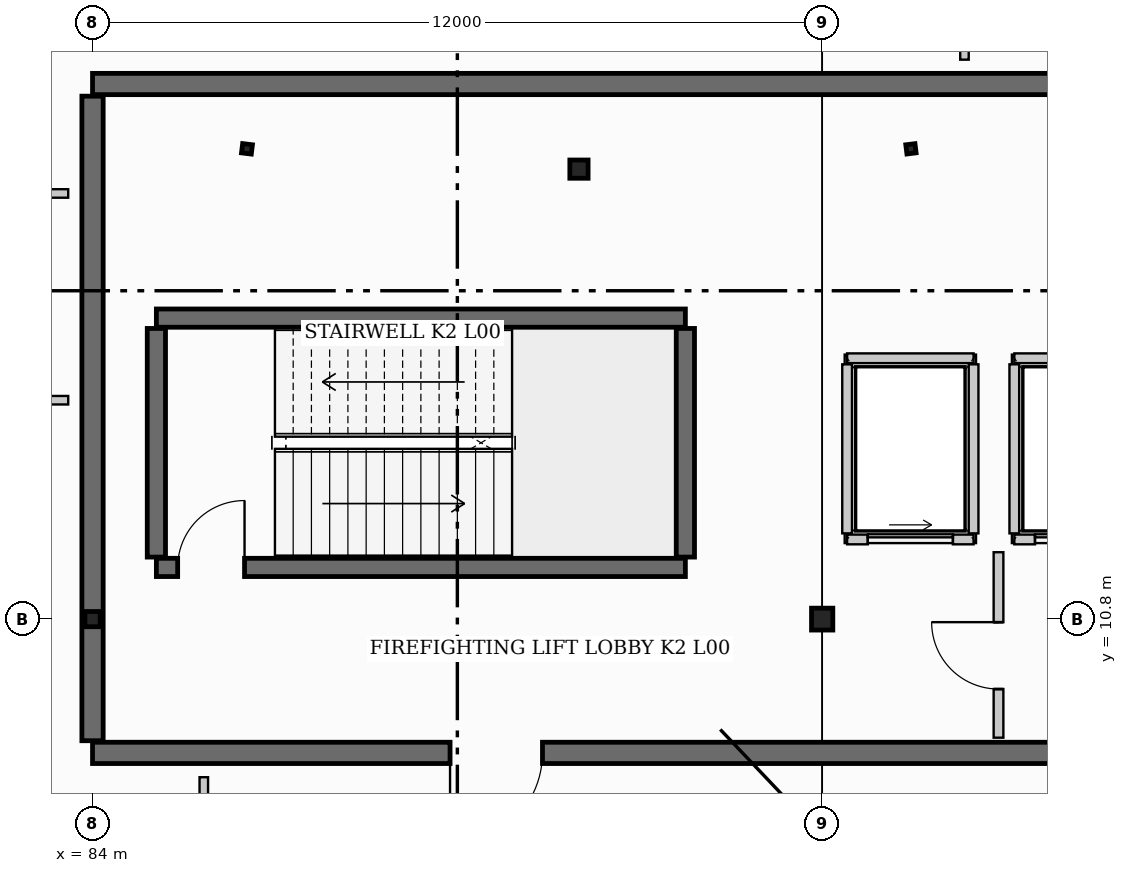
"""IFC4 building model, lengths in metres.
Left out: names, types, materials, properties, quantities, classifications, styles, units other than length and angle.
Written with IfcOpenShell. Run it as: python <this file> out.ifc"""

import sys

from ifc_helpers import new_model, si_unit, direction, frame, frame_2d, origin, origin_2d, place, context, subcontext, project, spatial, rectangle, hollow_rectangle, i_section, extrude, element, fill, save


model = new_model("IFC4")
c1 = context("Model", 3, precision=1e-05, world=origin(), true_north=direction((0.0, 1.0)))
c2 = subcontext(c1, "Body", "Model", "MODEL_VIEW")
j1 = project(units=[si_unit("LENGTHUNIT", "METRE"), si_unit("PLANEANGLEUNIT", "RADIAN")], contexts=[c1])
p1 = place(None, origin())
s1 = spatial("IfcSite", under=j1, at=p1, CompositionType="ELEMENT")
p2 = place(p1, origin())
s2 = spatial("IfcBuilding", under=s1, at=p2, CompositionType="ELEMENT")
p3 = place(p2, origin())
s3 = spatial("IfcBuildingStorey", under=s2, at=p3, CompositionType="ELEMENT", Elevation=0.0)
p4 = place(p3, frame((84.0, 10.8, 0.0), z_axis=(0.0, 0.0, 1.0), x_axis=(0.0, 1.0, 0.0)))
e1 = element("IfcColumn", 1, at=p4, inside=s3, PredefinedType="COLUMN", context=c2, shape_type="SweptSolid", body=[
    extrude(hollow_rectangle(XDim=0.25, YDim=0.25, WallThickness=0.012, at=origin_2d()), origin(), (0.0, 0.0, 1.0), 4.8),
])
p5 = place(p3, frame((96.0, 10.8, 0.0), z_axis=(0.0, 0.0, 1.0), x_axis=(1.0, 0.0, 0.0)))
e2 = element("IfcColumn", 2, at=p5, inside=s3, PredefinedType="COLUMN", context=c2, shape_type="SweptSolid", body=[
    extrude(i_section(OverallWidth=0.35, OverallDepth=0.36, WebThickness=0.016, FlangeThickness=0.028, at=origin_2d()), origin(), (0.0, 0.0, 1.0), 4.8),
])
p6 = place(p3, frame((86.54, 18.534, 0.0), z_axis=(0.0, 0.0, 1.0), x_axis=(0.121869343405, 0.992546151641, 0.0)))
e3 = element("IfcColumn", 3, at=p6, inside=s3, PredefinedType="COLUMN", context=c2, shape_type="SweptSolid", body=[
    extrude(i_section(OverallWidth=0.154, OverallDepth=0.162, WebThickness=0.008, FlangeThickness=0.011, at=origin_2d()), origin(), (0.0, 0.0, 1.0), 4.8),
])
p7 = place(p3, frame((92.0, 18.2, 0.0), z_axis=(0.0, 0.0, 1.0), x_axis=(0.0, 1.0, 0.0)))
e4 = element("IfcColumn", 4, at=p7, inside=s3, PredefinedType="COLUMN", context=c2, shape_type="SweptSolid", body=[
    extrude(hollow_rectangle(XDim=0.3, YDim=0.3, WallThickness=0.012, at=origin_2d()), origin(), (0.0, 0.0, 1.0), 4.8),
])
p8 = place(p3, frame((97.46, 18.534, 0.0), z_axis=(0.0, 0.0, 1.0), x_axis=(-0.121869343405, 0.992546151641, 0.0)))
e5 = element("IfcColumn", 5, at=p8, inside=s3, PredefinedType="COLUMN", context=c2, shape_type="SweptSolid", body=[
    extrude(i_section(OverallWidth=0.152, OverallDepth=0.152, WebThickness=0.006, FlangeThickness=0.007, at=origin_2d()), origin(), (0.0, 0.0, 1.0), 4.8),
])
p9 = place(p3, frame((84.0, 19.6, 0.0), z_axis=(0.0, 0.0, 1.0), x_axis=(1.0, 0.0, 0.0)))
e6 = element("IfcWall", 6, at=p9, inside=s3, PredefinedType="SHEAR", context=c2, shape_type="SweptSolid", body=[
    extrude(rectangle(XDim=20.4, YDim=0.35, at=frame_2d((10.2, 0.0))), origin(), (0.0, 0.0, 1.0), 4.8),
])
p10 = place(p3, frame((104.4, 8.6, 0.0), z_axis=(0.0, 0.0, 1.0), x_axis=(-1.0, 0.0, 0.0)))
e7 = element("IfcWall", 7, at=p10, inside=s3, PredefinedType="SHEAR", context=c2, shape_type="SweptSolid", body=[
    extrude(rectangle(XDim=20.4, YDim=0.35, at=frame_2d((10.2, 0.0))), origin(), (0.0, 0.0, 1.0), 4.8),
])
p11 = place(p10, frame((2.2, 0.0, 0.0)))
e8 = element("IfcOpeningElement", 8, at=p11, cuts=e7, PredefinedType="OPENING", context=c2, shape_type="SweptSolid", body=[
    extrude(rectangle(XDim=1.64, YDim=2.2, at=frame_2d((0.82, 1.1))), frame((0.0, 0.185, 0.0), z_axis=(0.0, -1.0, 0.0), x_axis=(1.0, 0.0, 0.0)), (0.0, 0.0, 1.0), 0.37),
])
p12 = place(p10, frame((13.0, 0.0, 0.0)))
e9 = element("IfcOpeningElement", 9, at=p12, cuts=e7, PredefinedType="OPENING", context=c2, shape_type="SweptSolid", body=[
    extrude(rectangle(XDim=1.52, YDim=2.16, at=frame_2d((0.76, 1.08))), frame((0.0, 0.185, 0.0), z_axis=(0.0, -1.0, 0.0), x_axis=(1.0, 0.0, 0.0)), (0.0, 0.0, 1.0), 0.37),
])
p13 = place(p3, frame((84.0, 8.8, 0.0), z_axis=(0.0, 0.0, 1.0), x_axis=(0.0, 1.0, 0.0)))
e10 = element("IfcWall", 10, at=p13, inside=s3, PredefinedType="SHEAR", context=c2, shape_type="SweptSolid", body=[
    extrude(rectangle(XDim=10.6, YDim=0.35, at=frame_2d((5.3, 0.0))), origin(), (0.0, 0.0, 1.0), 4.8),
])
p14 = place(p3, frame((85.05, 11.65, 0.0), z_axis=(0.0, 0.0, 1.0), x_axis=(1.0, 0.0, 0.0)))
e11 = element("IfcWall", 11, at=p14, inside=s3, PredefinedType="SHEAR", context=c2, shape_type="SweptSolid", body=[
    extrude(rectangle(XDim=8.7, YDim=0.3, at=frame_2d((4.35, 0.0))), origin(), (0.0, 0.0, 1.0), 4.8),
])
p15 = place(p14, frame((0.35, 0.0, 0.0)))
e12 = element("IfcOpeningElement", 12, at=p15, cuts=e11, PredefinedType="OPENING", context=c2, shape_type="SweptSolid", body=[
    extrude(rectangle(XDim=1.1, YDim=2.15, at=frame_2d((0.55, 1.075))), frame((0.0, 0.16, 0.0), z_axis=(0.0, -1.0, 0.0), x_axis=(1.0, 0.0, 0.0)), (0.0, 0.0, 1.0), 0.32),
])
p16 = place(p3, frame((93.75, 15.75, 0.0), z_axis=(0.0, 0.0, 1.0), x_axis=(-1.0, 0.0, 0.0)))
e13 = element("IfcWall", 13, at=p16, inside=s3, PredefinedType="SHEAR", context=c2, shape_type="SweptSolid", body=[
    extrude(rectangle(XDim=8.7, YDim=0.3, at=frame_2d((4.35, 0.0))), origin(), (0.0, 0.0, 1.0), 4.8),
])
for number, where, z_axis, x_axis in (
    (14, (85.05, 11.82, 0.0), (0.0, 0.0, 1.0), (0.0, 1.0, 0.0)),
    (15, (93.75, 11.82, 0.0), (0.0, 0.0, 1.0), (0.0, 1.0, 0.0)),
):
    element("IfcWall", number, at=place(p3, frame(where, z_axis=z_axis, x_axis=x_axis)), inside=s3, PredefinedType="SHEAR", context=c2, shape_type="SweptSolid", body=[
        extrude(rectangle(XDim=3.76, YDim=0.3, at=frame_2d((1.88, 0.0))), origin(), (0.0, 0.0, 1.0), 4.8),
    ])
p17 = place(p3, frame((96.41, 12.11, 0.0), z_axis=(0.0, 0.0, 1.0), x_axis=(1.0, 0.0, 0.0)))
e16 = element("IfcWall", 16, at=p17, inside=s3, PredefinedType="PARTITIONING", context=c2, shape_type="SweptSolid", body=[
    extrude(rectangle(XDim=2.08, YDim=0.16, at=frame_2d((1.04, 0.0))), origin(), (0.0, 0.0, 1.0), 4.445),
])
p18 = place(p17, frame((0.34, 0.0, 0.0)))
e17 = element("IfcOpeningElement", 17, at=p18, cuts=e16, PredefinedType="OPENING", context=c2, shape_type="SweptSolid", body=[
    extrude(rectangle(XDim=1.4, YDim=2.2, at=frame_2d((0.7, 1.1))), frame((0.0, 0.09, 0.0), z_axis=(0.0, -1.0, 0.0), x_axis=(1.0, 0.0, 0.0)), (0.0, 0.0, 1.0), 0.18),
])
p19 = place(p3, frame((98.49, 15.09, 0.0), z_axis=(0.0, 0.0, 1.0), x_axis=(-1.0, 0.0, 0.0)))
e18 = element("IfcWall", 18, at=p19, inside=s3, PredefinedType="PARTITIONING", context=c2, shape_type="SweptSolid", body=[
    extrude(rectangle(XDim=2.08, YDim=0.16, at=frame_2d((1.04, 0.0))), origin(), (0.0, 0.0, 1.0), 4.445),
])
for number, where, z_axis, x_axis in (
    (19, (96.41, 14.99, 0.0), (0.0, 0.0, 1.0), (0.0, -1.0, 0.0)),
    (20, (98.49, 12.21, 0.0), (0.0, 0.0, 1.0), (0.0, 1.0, 0.0)),
):
    element("IfcWall", number, at=place(p3, frame(where, z_axis=z_axis, x_axis=x_axis)), inside=s3, PredefinedType="PARTITIONING", context=c2, shape_type="SweptSolid", body=[
        extrude(rectangle(XDim=2.78, YDim=0.16, at=frame_2d((1.39, 0.0))), origin(), (0.0, 0.0, 1.0), 4.445),
    ])
p20 = place(p3, frame((99.16, 12.11, 0.0), z_axis=(0.0, 0.0, 1.0), x_axis=(1.0, 0.0, 0.0)))
e21 = element("IfcWall", 21, at=p20, inside=s3, PredefinedType="PARTITIONING", context=c2, shape_type="SweptSolid", body=[
    extrude(rectangle(XDim=2.08, YDim=0.16, at=frame_2d((1.04, 0.0))), origin(), (0.0, 0.0, 1.0), 4.445),
])
p21 = place(p20, frame((0.34, 0.0, 0.0)))
e22 = element("IfcOpeningElement", 22, at=p21, cuts=e21, PredefinedType="OPENING", context=c2, shape_type="SweptSolid", body=[
    extrude(rectangle(XDim=1.4, YDim=2.2, at=frame_2d((0.7, 1.1))), frame((0.0, 0.09, 0.0), z_axis=(0.0, -1.0, 0.0), x_axis=(1.0, 0.0, 0.0)), (0.0, 0.0, 1.0), 0.18),
])
p22 = place(p3, frame((101.24, 15.09, 0.0), z_axis=(0.0, 0.0, 1.0), x_axis=(-1.0, 0.0, 0.0)))
e23 = element("IfcWall", 23, at=p22, inside=s3, PredefinedType="PARTITIONING", context=c2, shape_type="SweptSolid", body=[
    extrude(rectangle(XDim=2.08, YDim=0.16, at=frame_2d((1.04, 0.0))), origin(), (0.0, 0.0, 1.0), 4.445),
])
p23 = place(p3, frame((99.16, 14.99, 0.0), z_axis=(0.0, 0.0, 1.0), x_axis=(0.0, -1.0, 0.0)))
e24 = element("IfcWall", 24, at=p23, inside=s3, PredefinedType="PARTITIONING", context=c2, shape_type="SweptSolid", body=[
    extrude(rectangle(XDim=2.78, YDim=0.16, at=frame_2d((1.39, 0.0))), origin(), (0.0, 0.0, 1.0), 4.445),
])
p24 = place(p3, frame((98.9, 8.85, 0.0), z_axis=(0.0, 0.0, 1.0), x_axis=(0.0, 1.0, 0.0)))
e25 = element("IfcWall", 25, at=p24, inside=s3, PredefinedType="PARTITIONING", context=c2, shape_type="SweptSolid", body=[
    extrude(rectangle(XDim=3.05, YDim=0.16, at=frame_2d((1.525, 0.0))), origin(), (0.0, 0.0, 1.0), 3.976),
])
p25 = place(p24, frame((0.8, 0.0, 0.0)))
e26 = element("IfcOpeningElement", 26, at=p25, cuts=e25, PredefinedType="OPENING", context=c2, shape_type="SweptSolid", body=[
    extrude(rectangle(XDim=1.1, YDim=2.15, at=frame_2d((0.55, 1.075))), frame((0.0, 0.09, 0.0), z_axis=(0.0, -1.0, 0.0), x_axis=(1.0, 0.0, 0.0)), (0.0, 0.0, 1.0), 0.18),
])
p26 = place(p3, frame((67.065, 14.4, 0.0), z_axis=(0.0, 0.0, 1.0), x_axis=(1.0, 0.0, 0.0)))
e27 = element("IfcWall", 27, at=p26, inside=s3, PredefinedType="PARTITIONING", context=c2, shape_type="SweptSolid", body=[
    extrude(rectangle(XDim=16.535, YDim=0.14, at=frame_2d((8.268, 0.0))), origin(), (0.0, 0.0, 1.0), 4.445),
])
p27 = place(p26, frame((7.617, 0.0, 0.0)))
e28 = element("IfcOpeningElement", 28, at=p27, cuts=e27, PredefinedType="OPENING", context=c2, shape_type="SweptSolid", body=[
    extrude(rectangle(XDim=0.96, YDim=2.06, at=frame_2d((0.48, 1.03))), frame((0.0, 0.08, 0.0), z_axis=(0.0, -1.0, 0.0), x_axis=(1.0, 0.0, 0.0)), (0.0, 0.0, 1.0), 0.16),
])
p28 = place(p3, frame((85.83, 0.3, 0.0), z_axis=(0.0, 0.0, 1.0), x_axis=(0.0, 1.0, 0.0)))
e29 = element("IfcWall", 29, at=p28, inside=s3, PredefinedType="PARTITIONING", context=c2, shape_type="SweptSolid", body=[
    extrude(rectangle(XDim=7.9, YDim=0.14, at=frame_2d((3.95, 0.0))), origin(), (0.0, 0.0, 1.0), 4.174),
])
p29 = place(p3, frame((73.32, 17.8, 0.0), z_axis=(0.0, 0.0, 1.0), x_axis=(1.0, 0.0, 0.0)))
e30 = element("IfcWall", 30, at=p29, inside=s3, PredefinedType="PARTITIONING", context=c2, shape_type="SweptSolid", body=[
    extrude(rectangle(XDim=10.28, YDim=0.14, at=frame_2d((5.14, 0.0))), origin(), (0.0, 0.0, 1.0), 4.445),
])
p30 = place(p29, frame((4.49, 0.0, 0.0)))
e31 = element("IfcOpeningElement", 31, at=p30, cuts=e30, PredefinedType="OPENING", context=c2, shape_type="SweptSolid", body=[
    extrude(rectangle(XDim=1.62, YDim=2.3, at=frame_2d((0.81, 1.15))), frame((0.0, 0.08, 0.0), z_axis=(0.0, -1.0, 0.0), x_axis=(1.0, 0.0, 0.0)), (0.0, 0.0, 1.0), 0.16),
])
p31 = place(p3, frame((98.34, 20.0, 0.0), z_axis=(0.0, 0.0, 1.0), x_axis=(0.0, 1.0, 0.0)))
e32 = element("IfcWall", 32, at=p31, inside=s3, PredefinedType="PARTITIONING", context=c2, shape_type="SweptSolid", body=[
    extrude(rectangle(XDim=25.3, YDim=0.14, at=frame_2d((12.65, 0.0))), origin(), (0.0, 0.0, 1.0), 3.53),
])
p32 = place(p18, origin())
e33 = element("IfcDoor", 33, at=p32, inside=s3, OperationType="SLIDING_TO_RIGHT", PredefinedType="DOOR", context=c2, shape_type="SweptSolid", body=[
    extrude(rectangle(XDim=1.4, YDim=2.2, at=frame_2d((0.7, 1.1))), frame((0.0, 0.025, 0.0), z_axis=(0.0, -1.0, 0.0), x_axis=(1.0, 0.0, 0.0)), (0.0, 0.0, 1.0), 0.05),
])
fill(e17, e33)
p33 = place(p21, origin())
e34 = element("IfcDoor", 34, at=p33, inside=s3, OperationType="SLIDING_TO_RIGHT", PredefinedType="DOOR", context=c2, shape_type="SweptSolid", body=[
    extrude(rectangle(XDim=1.4, YDim=2.2, at=frame_2d((0.7, 1.1))), frame((0.0, 0.025, 0.0), z_axis=(0.0, -1.0, 0.0), x_axis=(1.0, 0.0, 0.0)), (0.0, 0.0, 1.0), 0.05),
])
fill(e22, e34)
p34 = place(p15, origin())
e35 = element("IfcDoor", 35, at=p34, inside=s3, OperationType="SINGLE_SWING_RIGHT", PredefinedType="DOOR", context=c2, shape_type="SweptSolid", body=[
    extrude(rectangle(XDim=1.1, YDim=2.15, at=frame_2d((0.55, 1.075))), frame((0.0, 0.025, 0.0), z_axis=(0.0, -1.0, 0.0), x_axis=(1.0, 0.0, 0.0)), (0.0, 0.0, 1.0), 0.05),
])
fill(e12, e35)
p35 = place(p12, origin())
e36 = element("IfcDoor", 36, at=p35, inside=s3, OperationType="SINGLE_SWING_RIGHT", PredefinedType="DOOR", context=c2, shape_type="SweptSolid", body=[
    extrude(rectangle(XDim=1.52, YDim=2.16, at=frame_2d((0.76, 1.08))), frame((0.0, 0.025, 0.0), z_axis=(0.0, -1.0, 0.0), x_axis=(1.0, 0.0, 0.0)), (0.0, 0.0, 1.0), 0.05),
])
fill(e9, e36)
p36 = place(p25, origin())
e37 = element("IfcDoor", 37, at=p36, inside=s3, OperationType="SINGLE_SWING_RIGHT", PredefinedType="DOOR", context=c2, shape_type="SweptSolid", body=[
    extrude(rectangle(XDim=1.1, YDim=2.15, at=frame_2d((0.55, 1.075))), frame((0.0, 0.025, 0.0), z_axis=(0.0, -1.0, 0.0), x_axis=(1.0, 0.0, 0.0)), (0.0, 0.0, 1.0), 0.05),
])
fill(e26, e37)
save(model, sys.argv[1])
